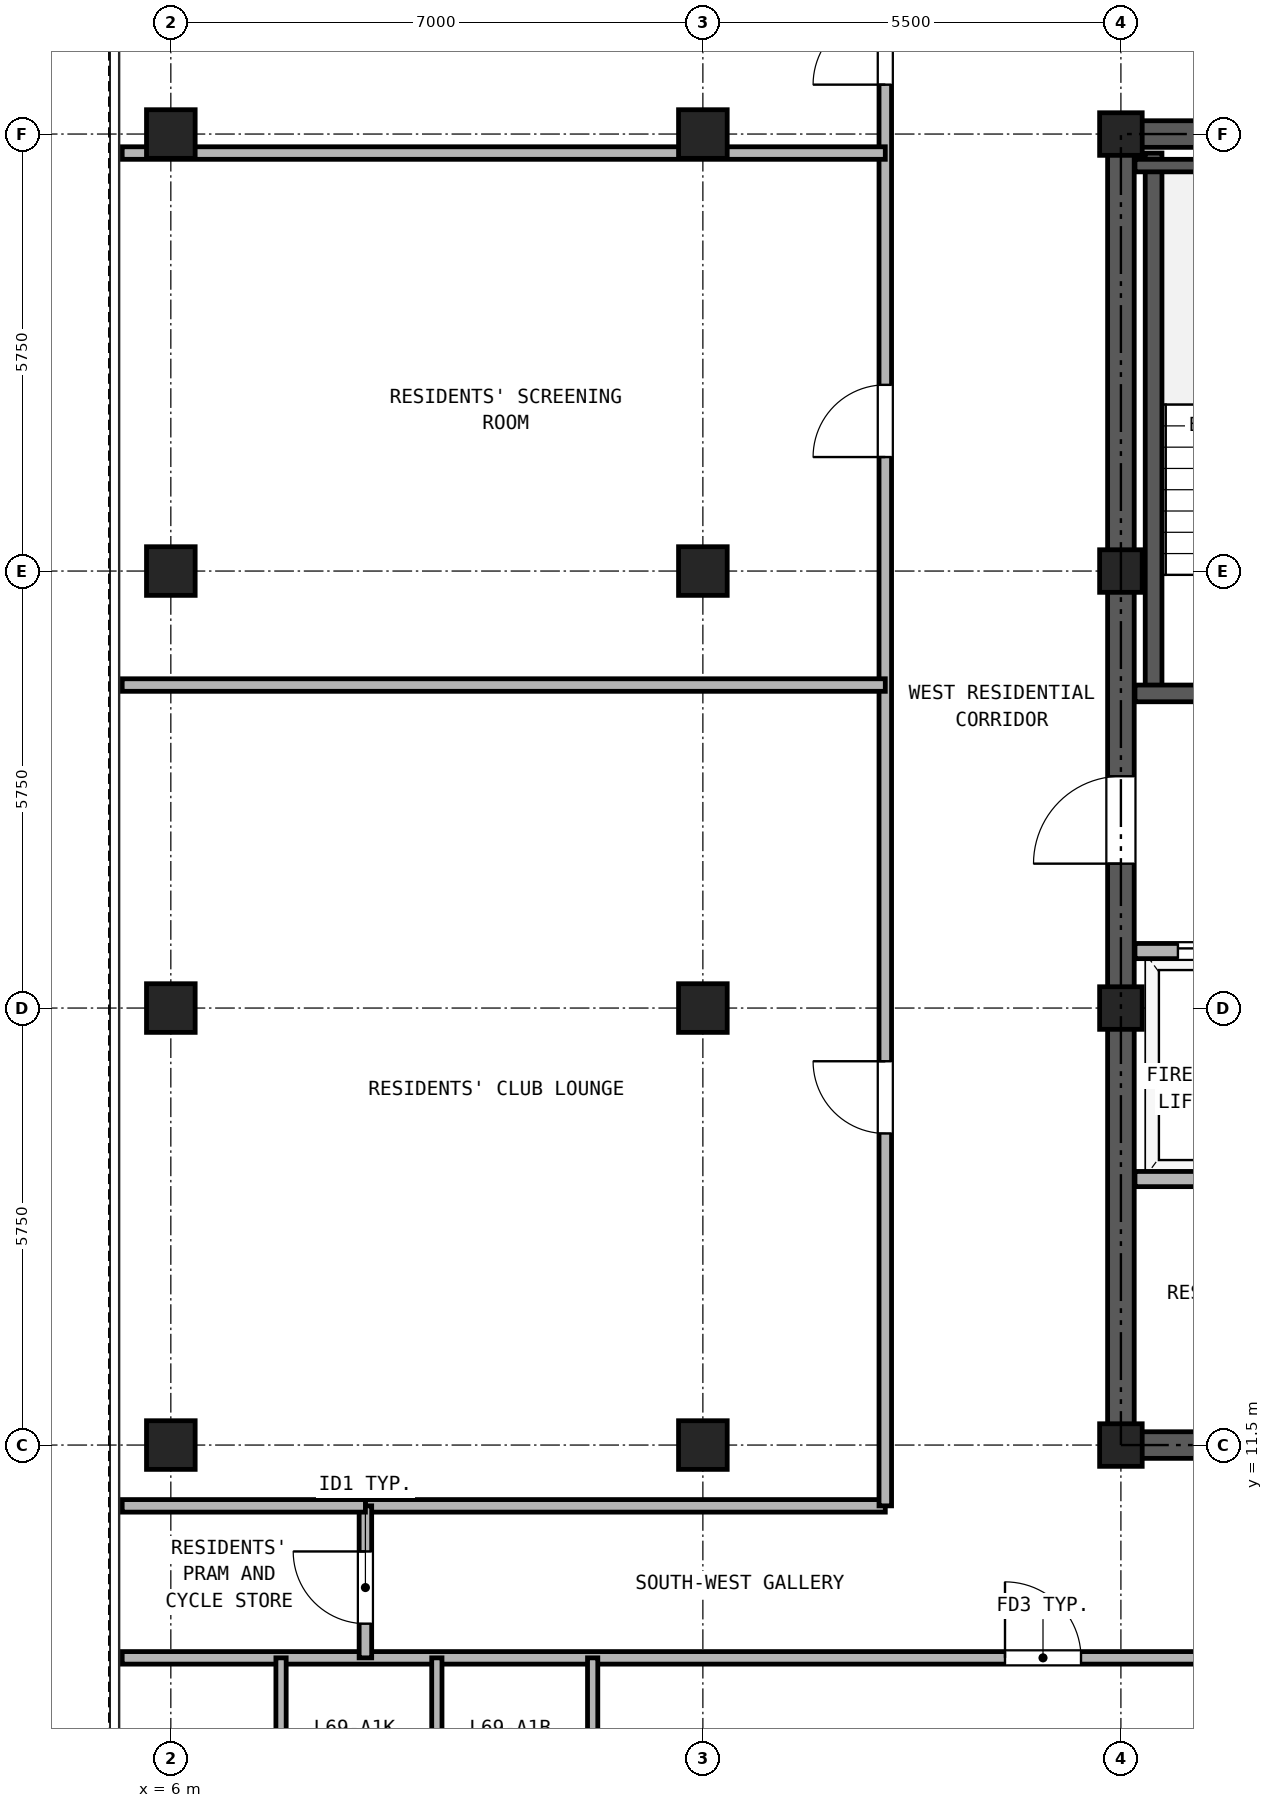
"""IFC4 building model, lengths in metres.
Left out: names, types, materials, properties, quantities, classifications, styles, units other than length and angle.
Written with IfcOpenShell. Run it as: python <this file> out.ifc"""

import sys

from ifc_helpers import new_model, si_unit, direction, frame, frame_2d, origin, origin_2d, place, context, subcontext, project, spatial, rectangle, hollow_rectangle, extrude, source, transform, mapped, element, fill, save


model = new_model("IFC4")
c1 = context("Model", 3, precision=1e-05, world=origin(), true_north=direction((0.0, 1.0)))
c2 = subcontext(c1, "Body", "Model", "MODEL_VIEW")
j1 = project(units=[si_unit("LENGTHUNIT", "METRE"), si_unit("PLANEANGLEUNIT", "RADIAN")], contexts=[c1])
p1 = place(None, origin())
s1 = spatial("IfcSite", under=j1, at=p1, CompositionType="ELEMENT")
p2 = place(p1, origin())
s2 = spatial("IfcBuilding", under=s1, at=p2, CompositionType="ELEMENT")
p3 = place(p2, frame((0.0, 0.0, 242.5)))
s3 = spatial("IfcBuildingStorey", under=s2, at=p3, CompositionType="ELEMENT", Elevation=242.5)
m1 = source(origin(), c2, "Body", "SweptSolid", [
    extrude(hollow_rectangle(XDim=0.64, YDim=0.64, WallThickness=0.035, at=origin_2d()), origin(), (0.0, 0.0, 1.0), 2.98),
])
for number, where, z_axis, x_axis in (
    (1, (6.0, 11.5, 0.0), (0.0, 0.0, 1.0), (1.0, 0.0, 0.0)),
    (2, (6.0, 17.25, 0.0), (0.0, 0.0, 1.0), (1.0, 0.0, 0.0)),
    (3, (6.0, 23.0, 0.0), (0.0, 0.0, 1.0), (1.0, 0.0, 0.0)),
    (4, (6.0, 28.75, 0.0), (0.0, 0.0, 1.0), (1.0, 0.0, 0.0)),
    (5, (13.0, 11.5, 0.0), (0.0, 0.0, 1.0), (1.0, 0.0, 0.0)),
    (6, (13.0, 17.25, 0.0), (0.0, 0.0, 1.0), (1.0, 0.0, 0.0)),
    (7, (13.0, 23.0, 0.0), (0.0, 0.0, 1.0), (1.0, 0.0, 0.0)),
    (8, (13.0, 28.75, 0.0), (0.0, 0.0, 1.0), (1.0, 0.0, 0.0)),
):
    element("IfcColumn", number, at=place(p3, frame(where, z_axis=z_axis, x_axis=x_axis)), inside=s3, PredefinedType="COLUMN", context=c2, shape_type="MappedRepresentation", body=[
        mapped(m1, transform((0.0, 0.0, 0.0), x_axis=(1.0, 0.0, 0.0), y_axis=(0.0, 1.0, 0.0), z_axis=(0.0, 0.0, 1.0), scale=1.0)),
    ])
m2 = source(origin(), c2, "Body", "SweptSolid", [
    extrude(hollow_rectangle(XDim=0.56, YDim=0.56, WallThickness=0.03, at=origin_2d()), origin(), (0.0, 0.0, 1.0), 2.98),
])
for number, where, z_axis, x_axis in (
    (9, (18.5, 11.5, 0.0), (0.0, 0.0, 1.0), (1.0, 0.0, 0.0)),
    (10, (18.5, 17.25, 0.0), (0.0, 0.0, 1.0), (1.0, 0.0, 0.0)),
    (11, (18.5, 23.0, 0.0), (0.0, 0.0, 1.0), (1.0, 0.0, 0.0)),
    (12, (18.5, 28.75, 0.0), (0.0, 0.0, 1.0), (1.0, 0.0, 0.0)),
):
    element("IfcColumn", number, at=place(p3, frame(where, z_axis=z_axis, x_axis=x_axis)), inside=s3, PredefinedType="COLUMN", context=c2, shape_type="MappedRepresentation", body=[
        mapped(m2, transform((0.0, 0.0, 0.0), x_axis=(1.0, 0.0, 0.0), y_axis=(0.0, 1.0, 0.0), z_axis=(0.0, 0.0, 1.0), scale=1.0)),
    ])
p4 = place(p3, frame((18.325, 11.5, 0.0), z_axis=(0.0, 0.0, 1.0), x_axis=(1.0, 0.0, 0.0)))
e13 = element("IfcWall", 13, at=p4, inside=s3, PredefinedType="SHEAR", context=c2, shape_type="SweptSolid", body=[
    extrude(rectangle(XDim=10.35, YDim=0.35, at=frame_2d((5.175, 0.0))), origin(), (0.0, 0.0, 1.0), 2.98),
])
p5 = place(p4, frame((1.775, 0.0, 0.0)))
e14 = element("IfcOpeningElement", 14, at=p5, cuts=e13, PredefinedType="OPENING", context=c2, shape_type="SweptSolid", body=[
    extrude(rectangle(XDim=0.95, YDim=2.15, at=frame_2d((0.475, 1.075))), frame((0.0, 0.185, 0.0), z_axis=(0.0, -1.0, 0.0), x_axis=(1.0, 0.0, 0.0)), (0.0, 0.0, 1.0), 0.37),
])
p6 = place(p4, frame((5.275, 0.0, 0.0)))
e15 = element("IfcOpeningElement", 15, at=p6, cuts=e13, PredefinedType="OPENING", context=c2, shape_type="SweptSolid", body=[
    extrude(rectangle(XDim=0.95, YDim=2.15, at=frame_2d((0.475, 1.075))), frame((0.0, 0.185, 0.0), z_axis=(0.0, -1.0, 0.0), x_axis=(1.0, 0.0, 0.0)), (0.0, 0.0, 1.0), 0.37),
])
p7 = place(p4, frame((8.175, 0.0, 0.0)))
e16 = element("IfcOpeningElement", 16, at=p7, cuts=e13, PredefinedType="OPENING", context=c2, shape_type="SweptSolid", body=[
    extrude(rectangle(XDim=1.1, YDim=2.25, at=frame_2d((0.55, 1.125))), frame((0.0, 0.185, 0.0), z_axis=(0.0, -1.0, 0.0), x_axis=(1.0, 0.0, 0.0)), (0.0, 0.0, 1.0), 0.37),
])
p8 = place(p3, frame((18.325, 28.75, 0.0), z_axis=(0.0, 0.0, 1.0), x_axis=(1.0, 0.0, 0.0)))
e17 = element("IfcWall", 17, at=p8, inside=s3, PredefinedType="SHEAR", context=c2, shape_type="SweptSolid", body=[
    extrude(rectangle(XDim=10.35, YDim=0.35, at=frame_2d((5.175, 0.0))), origin(), (0.0, 0.0, 1.0), 2.98),
])
p9 = place(p8, frame((4.055, 0.0, 0.0)))
e18 = element("IfcOpeningElement", 18, at=p9, cuts=e17, PredefinedType="OPENING", context=c2, shape_type="SweptSolid", body=[
    extrude(rectangle(XDim=0.9, YDim=2.05, at=frame_2d((0.45, 1.025))), frame((0.0, 0.185, 0.0), z_axis=(0.0, -1.0, 0.0), x_axis=(1.0, 0.0, 0.0)), (0.0, 0.0, 1.0), 0.37),
])
p10 = place(p8, frame((5.595, 0.0, 0.0)))
e19 = element("IfcOpeningElement", 19, at=p10, cuts=e17, PredefinedType="OPENING", context=c2, shape_type="SweptSolid", body=[
    extrude(rectangle(XDim=0.9, YDim=2.05, at=frame_2d((0.45, 1.025))), frame((0.0, 0.185, 0.0), z_axis=(0.0, -1.0, 0.0), x_axis=(1.0, 0.0, 0.0)), (0.0, 0.0, 1.0), 0.37),
])
p11 = place(p3, frame((18.5, 11.675, 0.0), z_axis=(0.0, 0.0, 1.0), x_axis=(0.0, 1.0, 0.0)))
e20 = element("IfcWall", 20, at=p11, inside=s3, PredefinedType="SHEAR", context=c2, shape_type="SweptSolid", body=[
    extrude(rectangle(XDim=16.9, YDim=0.35, at=frame_2d((8.45, 0.0))), origin(), (0.0, 0.0, 1.0), 2.98),
])
p12 = place(p11, frame((7.475, 0.0, 0.0)))
e21 = element("IfcOpeningElement", 21, at=p12, cuts=e20, PredefinedType="OPENING", context=c2, shape_type="SweptSolid", body=[
    extrude(rectangle(XDim=1.15, YDim=2.2, at=frame_2d((0.575, 1.1))), frame((0.0, 0.185, 0.0), z_axis=(0.0, -1.0, 0.0), x_axis=(1.0, 0.0, 0.0)), (0.0, 0.0, 1.0), 0.37),
])
p13 = place(p3, frame((18.93, 21.39, 0.0), z_axis=(0.0, 0.0, 1.0), x_axis=(0.0, 1.0, 0.0)))
e22 = element("IfcWall", 22, at=p13, inside=s3, PredefinedType="SOLIDWALL", context=c2, shape_type="SweptSolid", body=[
    extrude(rectangle(XDim=7.11, YDim=0.22, at=frame_2d((3.555, 0.0))), origin(), (0.0, 0.0, 1.0), 2.98),
])
p14 = place(p3, frame((18.685, 28.335, 0.0), z_axis=(0.0, 0.0, 1.0), x_axis=(1.0, 0.0, 0.0)))
e23 = element("IfcWall", 23, at=p14, inside=s3, PredefinedType="PARTITIONING", context=c2, shape_type="SweptSolid", body=[
    extrude(rectangle(XDim=3.425, YDim=0.165, at=frame_2d((1.712, 0.0))), origin(), (0.0, 0.0, 1.0), 2.98),
])
p15 = place(p3, frame((18.685, 21.39, 0.0), z_axis=(0.0, 0.0, 1.0), x_axis=(1.0, 0.0, 0.0)))
e24 = element("IfcWall", 24, at=p15, inside=s3, PredefinedType="SOLIDWALL", context=c2, shape_type="SweptSolid", body=[
    extrude(rectangle(XDim=6.445, YDim=0.22, at=frame_2d((3.222, 0.0))), origin(), (0.0, 0.0, 1.0), 2.98),
])
p16 = place(p15, frame((1.165, 0.0, 0.0)))
e25 = element("IfcOpeningElement", 25, at=p16, cuts=e24, PredefinedType="OPENING", context=c2, shape_type="SweptSolid", body=[
    extrude(rectangle(XDim=1.15, YDim=2.2, at=frame_2d((0.575, 1.1))), frame((0.0, 0.12, 0.0), z_axis=(0.0, -1.0, 0.0), x_axis=(1.0, 0.0, 0.0)), (0.0, 0.0, 1.0), 0.24),
])
p17 = place(p15, frame((4.895, 0.0, 0.0)))
e26 = element("IfcOpeningElement", 26, at=p17, cuts=e24, PredefinedType="OPENING", context=c2, shape_type="SweptSolid", body=[
    extrude(rectangle(XDim=1.1, YDim=2.25, at=frame_2d((0.55, 1.125))), frame((0.0, 0.12, 0.0), z_axis=(0.0, -1.0, 0.0), x_axis=(1.0, 0.0, 0.0)), (0.0, 0.0, 1.0), 0.24),
])
p18 = place(p3, frame((18.685, 18.0, 0.0), z_axis=(0.0, 0.0, 1.0), x_axis=(1.0, 0.0, 0.0)))
e27 = element("IfcWall", 27, at=p18, inside=s3, PredefinedType="PARTITIONING", context=c2, shape_type="SweptSolid", body=[
    extrude(rectangle(XDim=9.63, YDim=0.2, at=frame_2d((4.815, 0.0))), origin(), (0.0, 0.0, 1.0), 2.98),
])
p19 = place(p18, frame((0.565, 0.0, 0.0)))
e28 = element("IfcOpeningElement", 28, at=p19, cuts=e27, PredefinedType="OPENING", context=c2, shape_type="SweptSolid", body=[
    extrude(rectangle(XDim=1.3, YDim=2.3, at=frame_2d((0.65, 1.15))), frame((0.0, 0.11, 0.0), z_axis=(0.0, -1.0, 0.0), x_axis=(1.0, 0.0, 0.0)), (0.0, 0.0, 1.0), 0.22),
])
p20 = place(p18, frame((2.665, 0.0, 0.0)))
e29 = element("IfcOpeningElement", 29, at=p20, cuts=e27, PredefinedType="OPENING", context=c2, shape_type="SweptSolid", body=[
    extrude(rectangle(XDim=1.3, YDim=2.3, at=frame_2d((0.65, 1.15))), frame((0.0, 0.11, 0.0), z_axis=(0.0, -1.0, 0.0), x_axis=(1.0, 0.0, 0.0)), (0.0, 0.0, 1.0), 0.22),
])
p21 = place(p18, frame((7.165, 0.0, 0.0)))
e30 = element("IfcOpeningElement", 30, at=p21, cuts=e27, PredefinedType="OPENING", context=c2, shape_type="SweptSolid", body=[
    extrude(rectangle(XDim=1.0, YDim=2.15, at=frame_2d((0.5, 1.075))), frame((0.0, 0.11, 0.0), z_axis=(0.0, -1.0, 0.0), x_axis=(1.0, 0.0, 0.0)), (0.0, 0.0, 1.0), 0.22),
])
p22 = place(p3, frame((18.685, 15.0, 0.0), z_axis=(0.0, 0.0, 1.0), x_axis=(1.0, 0.0, 0.0)))
e31 = element("IfcWall", 31, at=p22, inside=s3, PredefinedType="PARTITIONING", context=c2, shape_type="SweptSolid", body=[
    extrude(rectangle(XDim=9.63, YDim=0.2, at=frame_2d((4.815, 0.0))), origin(), (0.0, 0.0, 1.0), 2.98),
])
p23 = place(p3, frame((5.36, 8.7, 0.0), z_axis=(0.0, 0.0, 1.0), x_axis=(1.0, 0.0, 0.0)))
e32 = element("IfcWall", 32, at=p23, inside=s3, PredefinedType="PARTITIONING", context=c2, shape_type="SweptSolid", body=[
    extrude(rectangle(XDim=36.28, YDim=0.165, at=frame_2d((18.14, 0.0))), origin(), (0.0, 0.0, 1.0), 2.655),
])
p24 = place(p23, frame((11.615, 0.0, 0.0)))
e33 = element("IfcOpeningElement", 33, at=p24, cuts=e32, PredefinedType="OPENING", context=c2, shape_type="SweptSolid", body=[
    extrude(rectangle(XDim=1.0, YDim=2.15, at=frame_2d((0.5, 1.075))), frame((0.0, 0.093, 0.0), z_axis=(0.0, -1.0, 0.0), x_axis=(1.0, 0.0, 0.0)), (0.0, 0.0, 1.0), 0.185),
])
p25 = place(p23, frame((23.665, 0.0, 0.0)))
e34 = element("IfcOpeningElement", 34, at=p25, cuts=e32, PredefinedType="OPENING", context=c2, shape_type="SweptSolid", body=[
    extrude(rectangle(XDim=1.0, YDim=2.15, at=frame_2d((0.5, 1.075))), frame((0.0, 0.093, 0.0), z_axis=(0.0, -1.0, 0.0), x_axis=(1.0, 0.0, 0.0)), (0.0, 0.0, 1.0), 0.185),
])
p26 = place(p3, frame((8.56, 10.7, 0.0), z_axis=(0.0, 0.0, 1.0), x_axis=(1.0, 0.0, 0.0)))
e35 = element("IfcWall", 35, at=p26, inside=s3, PredefinedType="PARTITIONING", context=c2, shape_type="SweptSolid", body=[
    extrude(rectangle(XDim=6.84, YDim=0.165, at=frame_2d((3.42, 0.0))), origin(), (0.0, 0.0, 1.0), 2.98),
])
p27 = place(p3, frame((8.56, 8.7, 0.0), z_axis=(0.0, 0.0, 1.0), x_axis=(0.0, 1.0, 0.0)))
e36 = element("IfcWall", 36, at=p27, inside=s3, PredefinedType="PARTITIONING", context=c2, shape_type="SweptSolid", body=[
    extrude(rectangle(XDim=2.0, YDim=0.165, at=frame_2d((1.0, 0.0))), origin(), (0.0, 0.0, 1.0), 2.98),
])
p28 = place(p27, frame((0.45, 0.0, 0.0)))
e37 = element("IfcOpeningElement", 37, at=p28, cuts=e36, PredefinedType="OPENING", context=c2, shape_type="SweptSolid", body=[
    extrude(rectangle(XDim=0.95, YDim=2.15, at=frame_2d((0.475, 1.075))), frame((0.0, 0.093, 0.0), z_axis=(0.0, -1.0, 0.0), x_axis=(1.0, 0.0, 0.0)), (0.0, 0.0, 1.0), 0.185),
])
p29 = place(p3, frame((15.4, 10.7, 0.0), z_axis=(0.0, 0.0, 1.0), x_axis=(0.0, 1.0, 0.0)))
e38 = element("IfcWall", 38, at=p29, inside=s3, PredefinedType="PARTITIONING", context=c2, shape_type="SweptSolid", body=[
    extrude(rectangle(XDim=24.44, YDim=0.165, at=frame_2d((12.22, 0.0))), origin(), (0.0, 0.0, 1.0), 2.98),
])
p30 = place(p29, frame((4.9, 0.0, 0.0)))
e39 = element("IfcOpeningElement", 39, at=p30, cuts=e38, PredefinedType="OPENING", context=c2, shape_type="SweptSolid", body=[
    extrude(rectangle(XDim=0.95, YDim=2.15, at=frame_2d((0.475, 1.075))), frame((0.0, 0.093, 0.0), z_axis=(0.0, -1.0, 0.0), x_axis=(1.0, 0.0, 0.0)), (0.0, 0.0, 1.0), 0.185),
])
p31 = place(p29, frame((13.8, 0.0, 0.0)))
e40 = element("IfcOpeningElement", 40, at=p31, cuts=e38, PredefinedType="OPENING", context=c2, shape_type="SweptSolid", body=[
    extrude(rectangle(XDim=0.95, YDim=2.15, at=frame_2d((0.475, 1.075))), frame((0.0, 0.093, 0.0), z_axis=(0.0, -1.0, 0.0), x_axis=(1.0, 0.0, 0.0)), (0.0, 0.0, 1.0), 0.185),
])
p32 = place(p29, frame((18.7, 0.0, 0.0)))
e41 = element("IfcOpeningElement", 41, at=p32, cuts=e38, PredefinedType="OPENING", context=c2, shape_type="SweptSolid", body=[
    extrude(rectangle(XDim=0.95, YDim=2.15, at=frame_2d((0.475, 1.075))), frame((0.0, 0.093, 0.0), z_axis=(0.0, -1.0, 0.0), x_axis=(1.0, 0.0, 0.0)), (0.0, 0.0, 1.0), 0.185),
])
for number, where, z_axis, x_axis in (
    (42, (7.45, 6.55, 0.0), (0.0, 0.0, 1.0), (0.0, 1.0, 0.0)),
    (43, (9.5, 6.55, 0.0), (0.0, 0.0, 1.0), (0.0, 1.0, 0.0)),
    (44, (11.55, 6.55, 0.0), (0.0, 0.0, 1.0), (0.0, 1.0, 0.0)),
):
    element("IfcWall", number, at=place(p3, frame(where, z_axis=z_axis, x_axis=x_axis)), inside=s3, PredefinedType="PARTITIONING", context=c2, shape_type="SweptSolid", body=[
        extrude(rectangle(XDim=2.15, YDim=0.135, at=frame_2d((1.075, 0.0))), origin(), (0.0, 0.0, 1.0), 2.98),
    ])
p33 = place(p3, frame((5.36, 10.7, 0.0), z_axis=(0.0, 0.0, 1.0), x_axis=(1.0, 0.0, 0.0)))
e45 = element("IfcWall", 45, at=p33, inside=s3, PredefinedType="PARTITIONING", context=c2, shape_type="SweptSolid", body=[
    extrude(rectangle(XDim=3.2, YDim=0.165, at=frame_2d((1.6, 0.0))), origin(), (0.0, 0.0, 1.0), 2.98),
])
p34 = place(p3, frame((5.36, 21.5, 0.0), z_axis=(0.0, 0.0, 1.0), x_axis=(1.0, 0.0, 0.0)))
e46 = element("IfcWall", 46, at=p34, inside=s3, PredefinedType="PARTITIONING", context=c2, shape_type="SweptSolid", body=[
    extrude(rectangle(XDim=10.04, YDim=0.165, at=frame_2d((5.02, 0.0))), origin(), (0.0, 0.0, 1.0), 2.98),
])
p35 = place(p3, frame((5.36, 28.5, 0.0), z_axis=(0.0, 0.0, 1.0), x_axis=(1.0, 0.0, 0.0)))
e47 = element("IfcWall", 47, at=p35, inside=s3, PredefinedType="PARTITIONING", context=c2, shape_type="SweptSolid", body=[
    extrude(rectangle(XDim=10.04, YDim=0.165, at=frame_2d((5.02, 0.0))), origin(), (0.0, 0.0, 1.0), 2.428),
])
p36 = place(p19, origin())
e48 = element("IfcDoor", 48, at=p36, inside=s3, OperationType="DOUBLE_DOOR_SLIDING", PredefinedType="DOOR", context=c2, shape_type="SweptSolid", body=[
    extrude(rectangle(XDim=1.3, YDim=2.3, at=frame_2d((0.65, 1.15))), frame((0.0, 0.025, 0.0), z_axis=(0.0, -1.0, 0.0), x_axis=(1.0, 0.0, 0.0)), (0.0, 0.0, 1.0), 0.05),
])
fill(e28, e48)
p37 = place(p12, frame((1.15, 0.0, 0.0), z_axis=(0.0, 0.0, 1.0), x_axis=(-1.0, 0.0, 0.0)))
e49 = element("IfcDoor", 49, at=p37, inside=s3, OperationType="SINGLE_SWING_LEFT", PredefinedType="DOOR", context=c2, shape_type="SweptSolid", body=[
    extrude(rectangle(XDim=1.15, YDim=2.2, at=frame_2d((0.575, 1.1))), frame((0.0, 0.025, 0.0), z_axis=(0.0, -1.0, 0.0), x_axis=(1.0, 0.0, 0.0)), (0.0, 0.0, 1.0), 0.05),
])
fill(e21, e49)
p38 = place(p24, frame((1.0, 0.0, 0.0), z_axis=(0.0, 0.0, 1.0), x_axis=(-1.0, 0.0, 0.0)))
e50 = element("IfcDoor", 50, at=p38, inside=s3, OperationType="SINGLE_SWING_LEFT", PredefinedType="DOOR", context=c2, shape_type="SweptSolid", body=[
    extrude(rectangle(XDim=1.0, YDim=2.15, at=frame_2d((0.5, 1.075))), frame((0.0, 0.025, 0.0), z_axis=(0.0, -1.0, 0.0), x_axis=(1.0, 0.0, 0.0)), (0.0, 0.0, 1.0), 0.05),
])
fill(e33, e50)
p39 = place(p28, frame((0.95, 0.0, 0.0), z_axis=(0.0, 0.0, 1.0), x_axis=(-1.0, 0.0, 0.0)))
e51 = element("IfcDoor", 51, at=p39, inside=s3, OperationType="SINGLE_SWING_RIGHT", PredefinedType="DOOR", context=c2, shape_type="SweptSolid", body=[
    extrude(rectangle(XDim=0.95, YDim=2.15, at=frame_2d((0.475, 1.075))), frame((0.0, 0.025, 0.0), z_axis=(0.0, -1.0, 0.0), x_axis=(1.0, 0.0, 0.0)), (0.0, 0.0, 1.0), 0.05),
])
fill(e37, e51)
p40 = place(p30, frame((0.95, 0.0, 0.0), z_axis=(0.0, 0.0, 1.0), x_axis=(-1.0, 0.0, 0.0)))
e52 = element("IfcDoor", 52, at=p40, inside=s3, OperationType="SINGLE_SWING_RIGHT", PredefinedType="DOOR", context=c2, shape_type="SweptSolid", body=[
    extrude(rectangle(XDim=0.95, YDim=2.15, at=frame_2d((0.475, 1.075))), frame((0.0, 0.025, 0.0), z_axis=(0.0, -1.0, 0.0), x_axis=(1.0, 0.0, 0.0)), (0.0, 0.0, 1.0), 0.05),
])
fill(e39, e52)
p41 = place(p31, frame((0.95, 0.0, 0.0), z_axis=(0.0, 0.0, 1.0), x_axis=(-1.0, 0.0, 0.0)))
e53 = element("IfcDoor", 53, at=p41, inside=s3, OperationType="SINGLE_SWING_LEFT", PredefinedType="DOOR", context=c2, shape_type="SweptSolid", body=[
    extrude(rectangle(XDim=0.95, YDim=2.15, at=frame_2d((0.475, 1.075))), frame((0.0, 0.025, 0.0), z_axis=(0.0, -1.0, 0.0), x_axis=(1.0, 0.0, 0.0)), (0.0, 0.0, 1.0), 0.05),
])
fill(e40, e53)
p42 = place(p32, frame((0.95, 0.0, 0.0), z_axis=(0.0, 0.0, 1.0), x_axis=(-1.0, 0.0, 0.0)))
e54 = element("IfcDoor", 54, at=p42, inside=s3, OperationType="SINGLE_SWING_LEFT", PredefinedType="DOOR", context=c2, shape_type="SweptSolid", body=[
    extrude(rectangle(XDim=0.95, YDim=2.15, at=frame_2d((0.475, 1.075))), frame((0.0, 0.025, 0.0), z_axis=(0.0, -1.0, 0.0), x_axis=(1.0, 0.0, 0.0)), (0.0, 0.0, 1.0), 0.05),
])
fill(e41, e54)
save(model, sys.argv[1])
